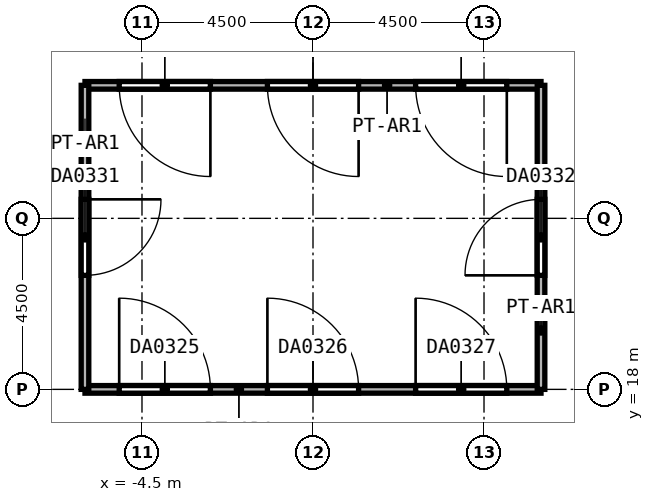
"""IFC4 building model, lengths in metres.
Left out: names, types, materials, properties, quantities, classifications, styles, units other than length and angle.
Written with IfcOpenShell. Run it as: python <this file> out.ifc"""

import sys

from ifc_helpers import new_model, si_unit, direction, frame, frame_2d, origin, place, context, subcontext, project, spatial, rectangle, extrude, element, fill, save


model = new_model("IFC4")
c1 = context("Model", 3, precision=1e-05, world=origin(), true_north=direction((0.0, 1.0)))
c2 = subcontext(c1, "Body", "Model", "MODEL_VIEW")
j1 = project(units=[si_unit("LENGTHUNIT", "METRE"), si_unit("PLANEANGLEUNIT", "RADIAN")], contexts=[c1])
p1 = place(None, origin())
s1 = spatial("IfcSite", under=j1, at=p1, CompositionType="ELEMENT")
p2 = place(p1, origin())
s2 = spatial("IfcBuilding", under=s1, at=p2, CompositionType="ELEMENT")
p3 = place(p2, origin())
s3 = spatial("IfcBuildingStorey", under=s2, at=p3, CompositionType="ELEMENT", Elevation=0.0)
p4 = place(p3, frame((-6.0, 18.0, 0.0), z_axis=(0.0, 0.0, 1.0), x_axis=(1.0, 0.0, 0.0)))
e1 = element("IfcWall", 1, at=p4, inside=s3, PredefinedType="PARTITIONING", context=c2, shape_type="SweptSolid", body=[
    extrude(rectangle(XDim=12.0, YDim=0.2, at=frame_2d((6.0, 0.0))), origin(), (0.0, 0.0, 1.0), 11.7),
])
p5 = place(p4, frame((0.9, 0.0, 0.0)))
e2 = element("IfcOpeningElement", 2, at=p5, cuts=e1, PredefinedType="OPENING", context=c2, shape_type="SweptSolid", body=[
    extrude(rectangle(XDim=2.4, YDim=2.4, at=frame_2d((1.2, 1.2))), frame((0.0, 0.1, 0.0), z_axis=(0.0, -1.0, 0.0), x_axis=(1.0, 0.0, 0.0)), (0.0, 0.0, 1.0), 0.2),
])
p6 = place(p4, frame((4.8, 0.0, 0.0)))
e3 = element("IfcOpeningElement", 3, at=p6, cuts=e1, PredefinedType="OPENING", context=c2, shape_type="SweptSolid", body=[
    extrude(rectangle(XDim=2.4, YDim=2.4, at=frame_2d((1.2, 1.2))), frame((0.0, 0.1, 0.0), z_axis=(0.0, -1.0, 0.0), x_axis=(1.0, 0.0, 0.0)), (0.0, 0.0, 1.0), 0.2),
])
p7 = place(p4, frame((8.7, 0.0, 0.0)))
e4 = element("IfcOpeningElement", 4, at=p7, cuts=e1, PredefinedType="OPENING", context=c2, shape_type="SweptSolid", body=[
    extrude(rectangle(XDim=2.4, YDim=2.4, at=frame_2d((1.2, 1.2))), frame((0.0, 0.1, 0.0), z_axis=(0.0, -1.0, 0.0), x_axis=(1.0, 0.0, 0.0)), (0.0, 0.0, 1.0), 0.2),
])
p8 = place(p3, frame((6.0, 26.0, 0.0), z_axis=(0.0, 0.0, 1.0), x_axis=(-1.0, 0.0, 0.0)))
e5 = element("IfcWall", 5, at=p8, inside=s3, PredefinedType="PARTITIONING", context=c2, shape_type="SweptSolid", body=[
    extrude(rectangle(XDim=12.0, YDim=0.2, at=frame_2d((6.0, 0.0))), origin(), (0.0, 0.0, 1.0), 11.7),
])
p9 = place(p8, frame((0.9, 0.0, 0.0)))
e6 = element("IfcOpeningElement", 6, at=p9, cuts=e5, PredefinedType="OPENING", context=c2, shape_type="SweptSolid", body=[
    extrude(rectangle(XDim=2.4, YDim=2.4, at=frame_2d((1.2, 1.2))), frame((0.0, 0.1, 0.0), z_axis=(0.0, -1.0, 0.0), x_axis=(1.0, 0.0, 0.0)), (0.0, 0.0, 1.0), 0.2),
])
p10 = place(p8, frame((4.8, 0.0, 0.0)))
e7 = element("IfcOpeningElement", 7, at=p10, cuts=e5, PredefinedType="OPENING", context=c2, shape_type="SweptSolid", body=[
    extrude(rectangle(XDim=2.4, YDim=2.4, at=frame_2d((1.2, 1.2))), frame((0.0, 0.1, 0.0), z_axis=(0.0, -1.0, 0.0), x_axis=(1.0, 0.0, 0.0)), (0.0, 0.0, 1.0), 0.2),
])
p11 = place(p8, frame((8.7, 0.0, 0.0)))
e8 = element("IfcOpeningElement", 8, at=p11, cuts=e5, PredefinedType="OPENING", context=c2, shape_type="SweptSolid", body=[
    extrude(rectangle(XDim=2.4, YDim=2.4, at=frame_2d((1.2, 1.2))), frame((0.0, 0.1, 0.0), z_axis=(0.0, -1.0, 0.0), x_axis=(1.0, 0.0, 0.0)), (0.0, 0.0, 1.0), 0.2),
])
p12 = place(p3, frame((-6.0, 26.0, 0.0), z_axis=(0.0, 0.0, 1.0), x_axis=(0.0, -1.0, 0.0)))
e9 = element("IfcWall", 9, at=p12, inside=s3, PredefinedType="PARTITIONING", context=c2, shape_type="SweptSolid", body=[
    extrude(rectangle(XDim=8.0, YDim=0.2, at=frame_2d((4.0, 0.0))), origin(), (0.0, 0.0, 1.0), 11.7),
])
p13 = place(p12, frame((3.0, 0.0, 0.0)))
e10 = element("IfcOpeningElement", 10, at=p13, cuts=e9, PredefinedType="OPENING", context=c2, shape_type="SweptSolid", body=[
    extrude(rectangle(XDim=2.0, YDim=2.4, at=frame_2d((1.0, 1.2))), frame((0.0, 0.1, 0.0), z_axis=(0.0, -1.0, 0.0), x_axis=(1.0, 0.0, 0.0)), (0.0, 0.0, 1.0), 0.2),
])
p14 = place(p3, frame((6.0, 18.0, 0.0), z_axis=(0.0, 0.0, 1.0), x_axis=(0.0, 1.0, 0.0)))
e11 = element("IfcWall", 11, at=p14, inside=s3, PredefinedType="PARTITIONING", context=c2, shape_type="SweptSolid", body=[
    extrude(rectangle(XDim=8.0, YDim=0.2, at=frame_2d((4.0, 0.0))), origin(), (0.0, 0.0, 1.0), 11.7),
])
p15 = place(p14, frame((3.0, 0.0, 0.0)))
e12 = element("IfcOpeningElement", 12, at=p15, cuts=e11, PredefinedType="OPENING", context=c2, shape_type="SweptSolid", body=[
    extrude(rectangle(XDim=2.0, YDim=2.4, at=frame_2d((1.0, 1.2))), frame((0.0, 0.1, 0.0), z_axis=(0.0, -1.0, 0.0), x_axis=(1.0, 0.0, 0.0)), (0.0, 0.0, 1.0), 0.2),
])
p16 = place(p5, frame((2.4, 0.0, 0.0), z_axis=(0.0, 0.0, 1.0), x_axis=(-1.0, 0.0, 0.0)))
e13 = element("IfcDoor", 13, at=p16, inside=s3, OperationType="DOUBLE_DOOR_SINGLE_SWING", PredefinedType="DOOR", context=c2, shape_type="SweptSolid", body=[
    extrude(rectangle(XDim=2.4, YDim=2.4, at=frame_2d((1.2, 1.2))), frame((0.0, 0.025, 0.0), z_axis=(0.0, -1.0, 0.0), x_axis=(1.0, 0.0, 0.0)), (0.0, 0.0, 1.0), 0.05),
])
fill(e2, e13)
p17 = place(p6, frame((2.4, 0.0, 0.0), z_axis=(0.0, 0.0, 1.0), x_axis=(-1.0, 0.0, 0.0)))
e14 = element("IfcDoor", 14, at=p17, inside=s3, OperationType="DOUBLE_DOOR_SINGLE_SWING", PredefinedType="DOOR", context=c2, shape_type="SweptSolid", body=[
    extrude(rectangle(XDim=2.4, YDim=2.4, at=frame_2d((1.2, 1.2))), frame((0.0, 0.025, 0.0), z_axis=(0.0, -1.0, 0.0), x_axis=(1.0, 0.0, 0.0)), (0.0, 0.0, 1.0), 0.05),
])
fill(e3, e14)
p18 = place(p7, frame((2.4, 0.0, 0.0), z_axis=(0.0, 0.0, 1.0), x_axis=(-1.0, 0.0, 0.0)))
e15 = element("IfcDoor", 15, at=p18, inside=s3, OperationType="DOUBLE_DOOR_SINGLE_SWING", PredefinedType="DOOR", context=c2, shape_type="SweptSolid", body=[
    extrude(rectangle(XDim=2.4, YDim=2.4, at=frame_2d((1.2, 1.2))), frame((0.0, 0.025, 0.0), z_axis=(0.0, -1.0, 0.0), x_axis=(1.0, 0.0, 0.0)), (0.0, 0.0, 1.0), 0.05),
])
fill(e4, e15)
p19 = place(p9, frame((2.4, 0.0, 0.0), z_axis=(0.0, 0.0, 1.0), x_axis=(-1.0, 0.0, 0.0)))
e16 = element("IfcDoor", 16, at=p19, inside=s3, OperationType="DOUBLE_DOOR_SINGLE_SWING", PredefinedType="DOOR", context=c2, shape_type="SweptSolid", body=[
    extrude(rectangle(XDim=2.4, YDim=2.4, at=frame_2d((1.2, 1.2))), frame((0.0, 0.025, 0.0), z_axis=(0.0, -1.0, 0.0), x_axis=(1.0, 0.0, 0.0)), (0.0, 0.0, 1.0), 0.05),
])
fill(e6, e16)
p20 = place(p10, frame((2.4, 0.0, 0.0), z_axis=(0.0, 0.0, 1.0), x_axis=(-1.0, 0.0, 0.0)))
e17 = element("IfcDoor", 17, at=p20, inside=s3, OperationType="DOUBLE_DOOR_SINGLE_SWING", PredefinedType="DOOR", context=c2, shape_type="SweptSolid", body=[
    extrude(rectangle(XDim=2.4, YDim=2.4, at=frame_2d((1.2, 1.2))), frame((0.0, 0.025, 0.0), z_axis=(0.0, -1.0, 0.0), x_axis=(1.0, 0.0, 0.0)), (0.0, 0.0, 1.0), 0.05),
])
fill(e7, e17)
p21 = place(p11, frame((2.4, 0.0, 0.0), z_axis=(0.0, 0.0, 1.0), x_axis=(-1.0, 0.0, 0.0)))
e18 = element("IfcDoor", 18, at=p21, inside=s3, OperationType="DOUBLE_DOOR_SINGLE_SWING", PredefinedType="DOOR", context=c2, shape_type="SweptSolid", body=[
    extrude(rectangle(XDim=2.4, YDim=2.4, at=frame_2d((1.2, 1.2))), frame((0.0, 0.025, 0.0), z_axis=(0.0, -1.0, 0.0), x_axis=(1.0, 0.0, 0.0)), (0.0, 0.0, 1.0), 0.05),
])
fill(e8, e18)
p22 = place(p13, frame((2.0, 0.0, 0.0), z_axis=(0.0, 0.0, 1.0), x_axis=(-1.0, 0.0, 0.0)))
e19 = element("IfcDoor", 19, at=p22, inside=s3, OperationType="DOUBLE_DOOR_SINGLE_SWING", PredefinedType="DOOR", context=c2, shape_type="SweptSolid", body=[
    extrude(rectangle(XDim=2.0, YDim=2.4, at=frame_2d((1.0, 1.2))), frame((0.0, 0.025, 0.0), z_axis=(0.0, -1.0, 0.0), x_axis=(1.0, 0.0, 0.0)), (0.0, 0.0, 1.0), 0.05),
])
fill(e10, e19)
p23 = place(p15, frame((2.0, 0.0, 0.0), z_axis=(0.0, 0.0, 1.0), x_axis=(-1.0, 0.0, 0.0)))
e20 = element("IfcDoor", 20, at=p23, inside=s3, OperationType="DOUBLE_DOOR_SINGLE_SWING", PredefinedType="DOOR", context=c2, shape_type="SweptSolid", body=[
    extrude(rectangle(XDim=2.0, YDim=2.4, at=frame_2d((1.0, 1.2))), frame((0.0, 0.025, 0.0), z_axis=(0.0, -1.0, 0.0), x_axis=(1.0, 0.0, 0.0)), (0.0, 0.0, 1.0), 0.05),
])
fill(e12, e20)
save(model, sys.argv[1])
